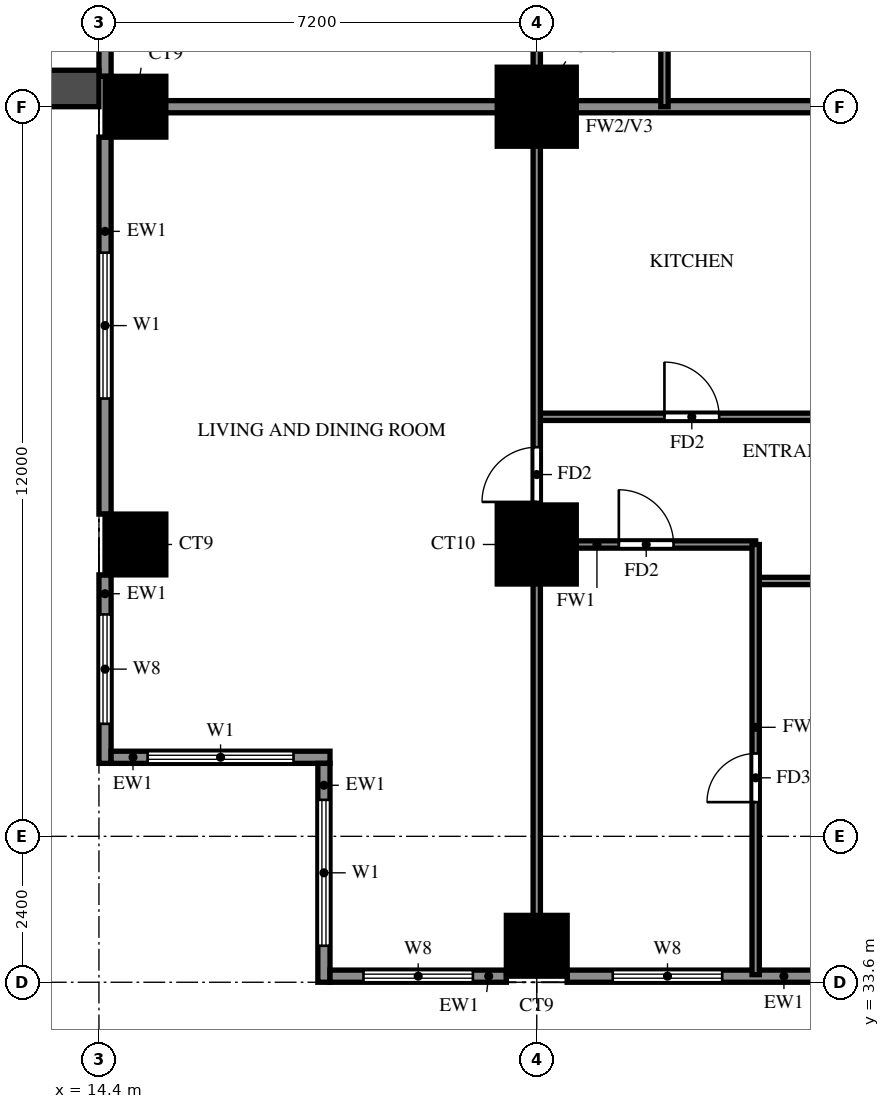
"""IFC4 building model, lengths in metres.
Left out: names, types, materials, properties, quantities, classifications, styles, units other than length and angle.
Written with IfcOpenShell. Run it as: python <this file> out.ifc"""

import sys

from ifc_helpers import new_model, si_unit, direction, frame, frame_2d, origin, origin_2d, place, context, subcontext, project, spatial, rectangle, extrude, source, transform, mapped, element, fill, save


model = new_model("IFC4")
c1 = context("Model", 3, precision=1e-05, world=origin(), true_north=direction((0.0, 1.0)))
c2 = subcontext(c1, "Body", "Model", "MODEL_VIEW")
j1 = project(units=[si_unit("LENGTHUNIT", "METRE"), si_unit("PLANEANGLEUNIT", "RADIAN")], contexts=[c1])
p1 = place(None, origin())
s1 = spatial("IfcSite", under=j1, at=p1, CompositionType="ELEMENT")
p2 = place(p1, origin())
s2 = spatial("IfcBuilding", under=s1, at=p2, CompositionType="ELEMENT")
p3 = place(p2, frame((0.0, 0.0, 79.5)))
s3 = spatial("IfcBuildingStorey", under=s2, at=p3, CompositionType="ELEMENT", Elevation=79.5)
m1 = source(origin(), c2, "Body", "SweptSolid", [
    extrude(rectangle(XDim=1.0, YDim=1.0, at=origin_2d()), origin(), (0.0, 0.0, 1.0), 3.18),
])
for number, where, z_axis, x_axis in (
    (1, (21.6, 34.2, 0.0), (0.0, 0.0, 1.0), (1.0, 0.0, 0.0)),
    (2, (15.0, 40.8, 0.0), (0.0, 0.0, 1.0), (1.0, 0.0, 0.0)),
):
    element("IfcColumn", number, at=place(p3, frame(where, z_axis=z_axis, x_axis=x_axis)), inside=s3, PredefinedType="COLUMN", context=c2, shape_type="MappedRepresentation", body=[
        mapped(m1, transform((0.0, 0.0, 0.0))),
    ])
m2 = source(origin(), c2, "Body", "SweptSolid", [
    extrude(rectangle(XDim=1.3, YDim=1.3, at=origin_2d()), origin(), (0.0, 0.0, 1.0), 3.18),
])
p4 = place(p3, frame((21.6, 40.8, 0.0), z_axis=(0.0, 0.0, 1.0), x_axis=(1.0, 0.0, 0.0)))
e3 = element("IfcColumn", 3, at=p4, inside=s3, PredefinedType="COLUMN", context=c2, shape_type="MappedRepresentation", body=[
    mapped(m2, transform((0.0, 0.0, 0.0))),
])
p5 = place(p3, frame((15.0, 48.0, 0.0), z_axis=(0.0, 0.0, 1.0), x_axis=(1.0, 0.0, 0.0)))
e4 = element("IfcColumn", 4, at=p5, inside=s3, PredefinedType="COLUMN", context=c2, shape_type="MappedRepresentation", body=[
    mapped(m1, transform((0.0, 0.0, 0.0))),
])
p6 = place(p3, frame((21.6, 48.0, 0.0), z_axis=(0.0, 0.0, 1.0), x_axis=(1.0, 0.0, 0.0)))
e5 = element("IfcColumn", 5, at=p6, inside=s3, PredefinedType="COLUMN", context=c2, shape_type="MappedRepresentation", body=[
    mapped(m2, transform((0.0, 0.0, 0.0))),
])
p7 = place(p3, frame((14.5, 54.7, 0.0), z_axis=(0.0, 0.0, 1.0), x_axis=(0.0, -1.0, 0.0)))
e6 = element("IfcWall", 6, at=p7, inside=s3, PredefinedType="SOLIDWALL", context=c2, shape_type="SweptSolid", body=[
    extrude(rectangle(XDim=6.2, YDim=0.2, at=frame_2d((3.1, 0.0))), origin(), (0.0, 0.0, 1.0), 3.18),
])
p8 = place(p7, frame((2.2, 0.0, 0.0)))
e7 = element("IfcOpeningElement", 7, at=p8, cuts=e6, PredefinedType="OPENING", context=c2, shape_type="SweptSolid", body=[
    extrude(rectangle(XDim=1.8, YDim=2.4, at=frame_2d((0.9, 1.2))), frame((0.0, 0.11, 0.0), z_axis=(0.0, -1.0, 0.0), x_axis=(1.0, 0.0, 0.0)), (0.0, 0.0, 1.0), 0.22),
])
p9 = place(p7, frame((0.45, 0.0, 0.6)))
e8 = element("IfcOpeningElement", 8, at=p9, cuts=e6, PredefinedType="OPENING", context=c2, shape_type="SweptSolid", body=[
    extrude(rectangle(XDim=1.2, YDim=2.4, at=frame_2d((0.6, 1.2))), frame((0.0, 0.11, 0.0), z_axis=(0.0, -1.0, 0.0), x_axis=(1.0, 0.0, 0.0)), (0.0, 0.0, 1.0), 0.22),
])
p10 = place(p7, frame((4.55, 0.0, 0.6)))
e9 = element("IfcOpeningElement", 9, at=p10, cuts=e6, PredefinedType="OPENING", context=c2, shape_type="SweptSolid", body=[
    extrude(rectangle(XDim=1.2, YDim=2.4, at=frame_2d((0.6, 1.2))), frame((0.0, 0.11, 0.0), z_axis=(0.0, -1.0, 0.0), x_axis=(1.0, 0.0, 0.0)), (0.0, 0.0, 1.0), 0.22),
])
p11 = place(p3, frame((14.5, 47.5, 0.0), z_axis=(0.0, 0.0, 1.0), x_axis=(0.0, -1.0, 0.0)))
e10 = element("IfcWall", 10, at=p11, inside=s3, PredefinedType="SOLIDWALL", context=c2, shape_type="SweptSolid", body=[
    extrude(rectangle(XDim=6.2, YDim=0.2, at=frame_2d((3.1, 0.0))), origin(), (0.0, 0.0, 1.0), 3.18),
])
p12 = place(p11, frame((1.9, 0.0, 0.6)))
e11 = element("IfcOpeningElement", 11, at=p12, cuts=e10, PredefinedType="OPENING", context=c2, shape_type="SweptSolid", body=[
    extrude(rectangle(XDim=2.4, YDim=2.4, at=frame_2d((1.2, 1.2))), frame((0.0, 0.11, 0.0), z_axis=(0.0, -1.0, 0.0), x_axis=(1.0, 0.0, 0.0)), (0.0, 0.0, 1.0), 0.22),
])
p13 = place(p3, frame((14.5, 40.3, 0.0), z_axis=(0.0, 0.0, 1.0), x_axis=(0.0, -1.0, 0.0)))
e12 = element("IfcWall", 12, at=p13, inside=s3, PredefinedType="SOLIDWALL", context=c2, shape_type="SweptSolid", body=[
    extrude(rectangle(XDim=3.1, YDim=0.2, at=frame_2d((1.55, 0.0))), origin(), (0.0, 0.0, 1.0), 3.18),
])
p14 = place(p13, frame((0.65, 0.0, 0.6)))
e13 = element("IfcOpeningElement", 13, at=p14, cuts=e12, PredefinedType="OPENING", context=c2, shape_type="SweptSolid", body=[
    extrude(rectangle(XDim=1.8, YDim=2.4, at=frame_2d((0.9, 1.2))), frame((0.0, 0.11, 0.0), z_axis=(0.0, -1.0, 0.0), x_axis=(1.0, 0.0, 0.0)), (0.0, 0.0, 1.0), 0.22),
])
p15 = place(p3, frame((14.6, 37.3, 0.0), z_axis=(0.0, 0.0, 1.0), x_axis=(1.0, 0.0, 0.0)))
e14 = element("IfcWall", 14, at=p15, inside=s3, PredefinedType="SOLIDWALL", context=c2, shape_type="SweptSolid", body=[
    extrude(rectangle(XDim=3.6, YDim=0.2, at=frame_2d((1.8, 0.0))), origin(), (0.0, 0.0, 1.0), 3.18),
])
p16 = place(p15, frame((0.6, 0.0, 0.6)))
e15 = element("IfcOpeningElement", 15, at=p16, cuts=e14, PredefinedType="OPENING", context=c2, shape_type="SweptSolid", body=[
    extrude(rectangle(XDim=2.4, YDim=2.4, at=frame_2d((1.2, 1.2))), frame((0.0, 0.11, 0.0), z_axis=(0.0, -1.0, 0.0), x_axis=(1.0, 0.0, 0.0)), (0.0, 0.0, 1.0), 0.22),
])
p17 = place(p3, frame((18.1, 37.2, 0.0), z_axis=(0.0, 0.0, 1.0), x_axis=(0.0, -1.0, 0.0)))
e16 = element("IfcWall", 16, at=p17, inside=s3, PredefinedType="SOLIDWALL", context=c2, shape_type="SweptSolid", body=[
    extrude(rectangle(XDim=3.6, YDim=0.2, at=frame_2d((1.8, 0.0))), origin(), (0.0, 0.0, 1.0), 3.18),
])
p18 = place(p17, frame((0.6, 0.0, 0.6)))
e17 = element("IfcOpeningElement", 17, at=p18, cuts=e16, PredefinedType="OPENING", context=c2, shape_type="SweptSolid", body=[
    extrude(rectangle(XDim=2.4, YDim=2.4, at=frame_2d((1.2, 1.2))), frame((0.0, 0.11, 0.0), z_axis=(0.0, -1.0, 0.0), x_axis=(1.0, 0.0, 0.0)), (0.0, 0.0, 1.0), 0.22),
])
p19 = place(p3, frame((18.2, 33.7, 0.0), z_axis=(0.0, 0.0, 1.0), x_axis=(1.0, 0.0, 0.0)))
e18 = element("IfcWall", 18, at=p19, inside=s3, PredefinedType="SOLIDWALL", context=c2, shape_type="SweptSolid", body=[
    extrude(rectangle(XDim=2.9, YDim=0.2, at=frame_2d((1.45, 0.0))), origin(), (0.0, 0.0, 1.0), 3.18),
])
p20 = place(p19, frame((0.55, 0.0, 0.6)))
e19 = element("IfcOpeningElement", 19, at=p20, cuts=e18, PredefinedType="OPENING", context=c2, shape_type="SweptSolid", body=[
    extrude(rectangle(XDim=1.8, YDim=2.4, at=frame_2d((0.9, 1.2))), frame((0.0, 0.11, 0.0), z_axis=(0.0, -1.0, 0.0), x_axis=(1.0, 0.0, 0.0)), (0.0, 0.0, 1.0), 0.22),
])
p21 = place(p3, frame((22.1, 33.7, 0.0), z_axis=(0.0, 0.0, 1.0), x_axis=(1.0, 0.0, 0.0)))
e20 = element("IfcWall", 20, at=p21, inside=s3, PredefinedType="SOLIDWALL", context=c2, shape_type="SweptSolid", body=[
    extrude(rectangle(XDim=6.2, YDim=0.2, at=frame_2d((3.1, 0.0))), origin(), (0.0, 0.0, 1.0), 3.18),
])
p22 = place(p21, frame((0.75, 0.0, 0.6)))
e21 = element("IfcOpeningElement", 21, at=p22, cuts=e20, PredefinedType="OPENING", context=c2, shape_type="SweptSolid", body=[
    extrude(rectangle(XDim=1.8, YDim=2.4, at=frame_2d((0.9, 1.2))), frame((0.0, 0.11, 0.0), z_axis=(0.0, -1.0, 0.0), x_axis=(1.0, 0.0, 0.0)), (0.0, 0.0, 1.0), 0.22),
])
p23 = place(p21, frame((4.1, 0.0, 1.5)))
e22 = element("IfcOpeningElement", 22, at=p23, cuts=e20, PredefinedType="OPENING", context=c2, shape_type="SweptSolid", body=[
    extrude(rectangle(XDim=0.9, YDim=0.9, at=frame_2d((0.45, 0.45))), frame((0.0, 0.11, 0.0), z_axis=(0.0, -1.0, 0.0), x_axis=(1.0, 0.0, 0.0)), (0.0, 0.0, 1.0), 0.22),
])
p24 = place(p3, frame((14.4, 48.3, 0.0), z_axis=(0.0, 0.0, 1.0), x_axis=(-1.0, 0.0, 0.0)))
e23 = element("IfcWall", 23, at=p24, inside=s3, PredefinedType="SOLIDWALL", context=c2, shape_type="SweptSolid", body=[
    extrude(rectangle(XDim=2.7, YDim=0.6, at=frame_2d((1.35, 0.0))), origin(), (0.0, 0.0, 1.0), 2.85),
])
p25 = place(p3, frame((14.525, 48.0, 0.0), z_axis=(0.0, 0.0, 1.0), x_axis=(1.0, 0.0, 0.0)))
e24 = element("IfcWall", 24, at=p25, inside=s3, PredefinedType="SOLIDWALL", context=c2, shape_type="SweptSolid", body=[
    extrude(rectangle(XDim=14.275, YDim=0.2, at=frame_2d((7.138, 0.0))), origin(), (0.0, 0.0, 1.0), 3.18),
])
p26 = place(p3, frame((25.2, 40.2, 0.0), z_axis=(0.0, 0.0, 1.0), x_axis=(1.0, 0.0, 0.0)))
e25 = element("IfcWall", 25, at=p26, inside=s3, PredefinedType="PARTITIONING", context=c2, shape_type="SweptSolid", body=[
    extrude(rectangle(XDim=3.6, YDim=0.12, at=frame_2d((1.8, 0.0))), origin(), (0.0, 0.0, 1.0), 3.18),
])
p27 = place(p3, frame((21.6, 40.8, 0.0), z_axis=(0.0, 0.0, 1.0), x_axis=(1.0, 0.0, 0.0)))
e26 = element("IfcWall", 26, at=p27, inside=s3, PredefinedType="PARTITIONING", context=c2, shape_type="SweptSolid", body=[
    extrude(rectangle(XDim=3.6, YDim=0.12, at=frame_2d((1.8, 0.0))), origin(), (0.0, 0.0, 1.0), 3.18),
])
p28 = place(p27, frame((1.35, 0.0, 0.0)))
e27 = element("IfcOpeningElement", 27, at=p28, cuts=e26, PredefinedType="OPENING", context=c2, shape_type="SweptSolid", body=[
    extrude(rectangle(XDim=0.9, YDim=2.1, at=frame_2d((0.45, 1.05))), frame((0.0, 0.07, 0.0), z_axis=(0.0, -1.0, 0.0), x_axis=(1.0, 0.0, 0.0)), (0.0, 0.0, 1.0), 0.14),
])
p29 = place(p3, frame((21.6, 42.9, 0.0), z_axis=(0.0, 0.0, 1.0), x_axis=(1.0, 0.0, 0.0)))
e28 = element("IfcWall", 28, at=p29, inside=s3, PredefinedType="PARTITIONING", context=c2, shape_type="SweptSolid", body=[
    extrude(rectangle(XDim=12.0, YDim=0.12, at=frame_2d((6.0, 0.0))), origin(), (0.0, 0.0, 1.0), 3.18),
])
p30 = place(p29, frame((2.1, 0.0, 0.0)))
e29 = element("IfcOpeningElement", 29, at=p30, cuts=e28, PredefinedType="OPENING", context=c2, shape_type="SweptSolid", body=[
    extrude(rectangle(XDim=0.9, YDim=2.1, at=frame_2d((0.45, 1.05))), frame((0.0, 0.07, 0.0), z_axis=(0.0, -1.0, 0.0), x_axis=(1.0, 0.0, 0.0)), (0.0, 0.0, 1.0), 0.14),
])
p31 = place(p29, frame((6.55, 0.0, 0.0)))
e30 = element("IfcOpeningElement", 30, at=p31, cuts=e28, PredefinedType="OPENING", context=c2, shape_type="SweptSolid", body=[
    extrude(rectangle(XDim=0.9, YDim=2.1, at=frame_2d((0.45, 1.05))), frame((0.0, 0.07, 0.0), z_axis=(0.0, -1.0, 0.0), x_axis=(1.0, 0.0, 0.0)), (0.0, 0.0, 1.0), 0.14),
])
p32 = place(p29, frame((10.0, 0.0, 0.0)))
e31 = element("IfcOpeningElement", 31, at=p32, cuts=e28, PredefinedType="OPENING", context=c2, shape_type="SweptSolid", body=[
    extrude(rectangle(XDim=0.9, YDim=2.1, at=frame_2d((0.45, 1.05))), frame((0.0, 0.07, 0.0), z_axis=(0.0, -1.0, 0.0), x_axis=(1.0, 0.0, 0.0)), (0.0, 0.0, 1.0), 0.14),
])
p33 = place(p3, frame((21.6, 33.725, 0.0), z_axis=(0.0, 0.0, 1.0), x_axis=(0.0, 1.0, 0.0)))
e32 = element("IfcWall", 32, at=p33, inside=s3, PredefinedType="PARTITIONING", context=c2, shape_type="SweptSolid", body=[
    extrude(rectangle(XDim=39.475, YDim=0.12, at=frame_2d((19.737, 0.0))), origin(), (0.0, 0.0, 1.0), 3.18),
])
p34 = place(p33, frame((7.775, 0.0, 0.0)))
e33 = element("IfcOpeningElement", 33, at=p34, cuts=e32, PredefinedType="OPENING", context=c2, shape_type="SweptSolid", body=[
    extrude(rectangle(XDim=0.9, YDim=2.1, at=frame_2d((0.45, 1.05))), frame((0.0, 0.07, 0.0), z_axis=(0.0, -1.0, 0.0), x_axis=(1.0, 0.0, 0.0)), (0.0, 0.0, 1.0), 0.14),
])
p35 = place(p33, frame((17.125, 0.0, 0.0)))
e34 = element("IfcOpeningElement", 34, at=p35, cuts=e32, PredefinedType="OPENING", context=c2, shape_type="SweptSolid", body=[
    extrude(rectangle(XDim=1.5, YDim=2.1, at=frame_2d((0.75, 1.05))), frame((0.0, 0.07, 0.0), z_axis=(0.0, -1.0, 0.0), x_axis=(1.0, 0.0, 0.0)), (0.0, 0.0, 1.0), 0.14),
])
p36 = place(p33, frame((22.825, 0.0, 0.0)))
e35 = element("IfcOpeningElement", 35, at=p36, cuts=e32, PredefinedType="OPENING", context=c2, shape_type="SweptSolid", body=[
    extrude(rectangle(XDim=0.9, YDim=2.1, at=frame_2d((0.45, 1.05))), frame((0.0, 0.07, 0.0), z_axis=(0.0, -1.0, 0.0), x_axis=(1.0, 0.0, 0.0)), (0.0, 0.0, 1.0), 0.14),
])
p37 = place(p33, frame((26.425, 0.0, 0.0)))
e36 = element("IfcOpeningElement", 36, at=p37, cuts=e32, PredefinedType="OPENING", context=c2, shape_type="SweptSolid", body=[
    extrude(rectangle(XDim=0.9, YDim=2.1, at=frame_2d((0.45, 1.05))), frame((0.0, 0.07, 0.0), z_axis=(0.0, -1.0, 0.0), x_axis=(1.0, 0.0, 0.0)), (0.0, 0.0, 1.0), 0.14),
])
p38 = place(p33, frame((30.025, 0.0, 0.0)))
e37 = element("IfcOpeningElement", 37, at=p38, cuts=e32, PredefinedType="OPENING", context=c2, shape_type="SweptSolid", body=[
    extrude(rectangle(XDim=0.9, YDim=2.1, at=frame_2d((0.45, 1.05))), frame((0.0, 0.07, 0.0), z_axis=(0.0, -1.0, 0.0), x_axis=(1.0, 0.0, 0.0)), (0.0, 0.0, 1.0), 0.14),
])
p39 = place(p33, frame((33.625, 0.0, 0.0)))
e38 = element("IfcOpeningElement", 38, at=p39, cuts=e32, PredefinedType="OPENING", context=c2, shape_type="SweptSolid", body=[
    extrude(rectangle(XDim=0.9, YDim=2.1, at=frame_2d((0.45, 1.05))), frame((0.0, 0.07, 0.0), z_axis=(0.0, -1.0, 0.0), x_axis=(1.0, 0.0, 0.0)), (0.0, 0.0, 1.0), 0.14),
])
p40 = place(p33, frame((37.225, 0.0, 0.0)))
e39 = element("IfcOpeningElement", 39, at=p40, cuts=e32, PredefinedType="OPENING", context=c2, shape_type="SweptSolid", body=[
    extrude(rectangle(XDim=0.9, YDim=2.1, at=frame_2d((0.45, 1.05))), frame((0.0, 0.07, 0.0), z_axis=(0.0, -1.0, 0.0), x_axis=(1.0, 0.0, 0.0)), (0.0, 0.0, 1.0), 0.14),
])
p41 = place(p3, frame((23.7, 48.0, 0.0), z_axis=(0.0, 0.0, 1.0), x_axis=(0.0, 1.0, 0.0)))
e40 = element("IfcWall", 40, at=p41, inside=s3, PredefinedType="PARTITIONING", context=c2, shape_type="SweptSolid", body=[
    extrude(rectangle(XDim=2.4, YDim=0.12, at=frame_2d((1.2, 0.0))), origin(), (0.0, 0.0, 1.0), 3.18),
])
p42 = place(p3, frame((25.2, 33.725, 0.0), z_axis=(0.0, 0.0, 1.0), x_axis=(0.0, 1.0, 0.0)))
e41 = element("IfcWall", 41, at=p42, inside=s3, PredefinedType="PARTITIONING", context=c2, shape_type="SweptSolid", body=[
    extrude(rectangle(XDim=7.075, YDim=0.12, at=frame_2d((3.538, 0.0))), origin(), (0.0, 0.0, 1.0), 2.28),
])
p43 = place(p42, frame((2.837, 0.0, 0.0)))
e42 = element("IfcOpeningElement", 42, at=p43, cuts=e41, PredefinedType="OPENING", context=c2, shape_type="SweptSolid", body=[
    extrude(rectangle(XDim=0.8, YDim=2.1, at=frame_2d((0.4, 1.05))), frame((0.0, 0.07, 0.0), z_axis=(0.0, -1.0, 0.0), x_axis=(1.0, 0.0, 0.0)), (0.0, 0.0, 1.0), 0.14),
])
p44 = place(p12, origin())
e43 = element("IfcWindow", 43, at=p44, inside=s3, PartitioningType="DOUBLE_PANEL_VERTICAL", PredefinedType="WINDOW", context=c2, shape_type="SweptSolid", body=[
    extrude(rectangle(XDim=2.4, YDim=2.4, at=frame_2d((1.2, 1.2))), frame((0.0, 0.03, 0.0), z_axis=(0.0, -1.0, 0.0), x_axis=(1.0, 0.0, 0.0)), (0.0, 0.0, 1.0), 0.06),
])
fill(e11, e43)
p45 = place(p14, origin())
e44 = element("IfcWindow", 44, at=p45, inside=s3, PartitioningType="DOUBLE_PANEL_VERTICAL", PredefinedType="WINDOW", context=c2, shape_type="SweptSolid", body=[
    extrude(rectangle(XDim=1.8, YDim=2.4, at=frame_2d((0.9, 1.2))), frame((0.0, 0.03, 0.0), z_axis=(0.0, -1.0, 0.0), x_axis=(1.0, 0.0, 0.0)), (0.0, 0.0, 1.0), 0.06),
])
fill(e13, e44)
p46 = place(p16, origin())
e45 = element("IfcWindow", 45, at=p46, inside=s3, PartitioningType="DOUBLE_PANEL_VERTICAL", PredefinedType="WINDOW", context=c2, shape_type="SweptSolid", body=[
    extrude(rectangle(XDim=2.4, YDim=2.4, at=frame_2d((1.2, 1.2))), frame((0.0, 0.03, 0.0), z_axis=(0.0, -1.0, 0.0), x_axis=(1.0, 0.0, 0.0)), (0.0, 0.0, 1.0), 0.06),
])
fill(e15, e45)
p47 = place(p18, origin())
e46 = element("IfcWindow", 46, at=p47, inside=s3, PartitioningType="DOUBLE_PANEL_VERTICAL", PredefinedType="WINDOW", context=c2, shape_type="SweptSolid", body=[
    extrude(rectangle(XDim=2.4, YDim=2.4, at=frame_2d((1.2, 1.2))), frame((0.0, 0.03, 0.0), z_axis=(0.0, -1.0, 0.0), x_axis=(1.0, 0.0, 0.0)), (0.0, 0.0, 1.0), 0.06),
])
fill(e17, e46)
p48 = place(p20, origin())
e47 = element("IfcWindow", 47, at=p48, inside=s3, PartitioningType="DOUBLE_PANEL_VERTICAL", PredefinedType="WINDOW", context=c2, shape_type="SweptSolid", body=[
    extrude(rectangle(XDim=1.8, YDim=2.4, at=frame_2d((0.9, 1.2))), frame((0.0, 0.03, 0.0), z_axis=(0.0, -1.0, 0.0), x_axis=(1.0, 0.0, 0.0)), (0.0, 0.0, 1.0), 0.06),
])
fill(e19, e47)
p49 = place(p22, origin())
e48 = element("IfcWindow", 48, at=p49, inside=s3, PartitioningType="DOUBLE_PANEL_VERTICAL", PredefinedType="WINDOW", context=c2, shape_type="SweptSolid", body=[
    extrude(rectangle(XDim=1.8, YDim=2.4, at=frame_2d((0.9, 1.2))), frame((0.0, 0.03, 0.0), z_axis=(0.0, -1.0, 0.0), x_axis=(1.0, 0.0, 0.0)), (0.0, 0.0, 1.0), 0.06),
])
fill(e21, e48)
p50 = place(p34, origin())
e49 = element("IfcDoor", 49, at=p50, inside=s3, OperationType="SINGLE_SWING_LEFT", PredefinedType="DOOR", context=c2, shape_type="SweptSolid", body=[
    extrude(rectangle(XDim=0.9, YDim=2.1, at=frame_2d((0.45, 1.05))), frame((0.0, 0.025, 0.0), z_axis=(0.0, -1.0, 0.0), x_axis=(1.0, 0.0, 0.0)), (0.0, 0.0, 1.0), 0.05),
])
fill(e33, e49)
p51 = place(p28, origin())
e50 = element("IfcDoor", 50, at=p51, inside=s3, OperationType="SINGLE_SWING_LEFT", PredefinedType="DOOR", context=c2, shape_type="SweptSolid", body=[
    extrude(rectangle(XDim=0.9, YDim=2.1, at=frame_2d((0.45, 1.05))), frame((0.0, 0.025, 0.0), z_axis=(0.0, -1.0, 0.0), x_axis=(1.0, 0.0, 0.0)), (0.0, 0.0, 1.0), 0.05),
])
fill(e27, e50)
p52 = place(p43, origin())
e51 = element("IfcDoor", 51, at=p52, inside=s3, OperationType="SINGLE_SWING_LEFT", PredefinedType="DOOR", context=c2, shape_type="SweptSolid", body=[
    extrude(rectangle(XDim=0.8, YDim=2.1, at=frame_2d((0.4, 1.05))), frame((0.0, 0.025, 0.0), z_axis=(0.0, -1.0, 0.0), x_axis=(1.0, 0.0, 0.0)), (0.0, 0.0, 1.0), 0.05),
])
fill(e42, e51)
p53 = place(p30, origin())
e52 = element("IfcDoor", 52, at=p53, inside=s3, OperationType="SINGLE_SWING_RIGHT", PredefinedType="DOOR", context=c2, shape_type="SweptSolid", body=[
    extrude(rectangle(XDim=0.9, YDim=2.1, at=frame_2d((0.45, 1.05))), frame((0.0, 0.025, 0.0), z_axis=(0.0, -1.0, 0.0), x_axis=(1.0, 0.0, 0.0)), (0.0, 0.0, 1.0), 0.05),
])
fill(e29, e52)
save(model, sys.argv[1])
